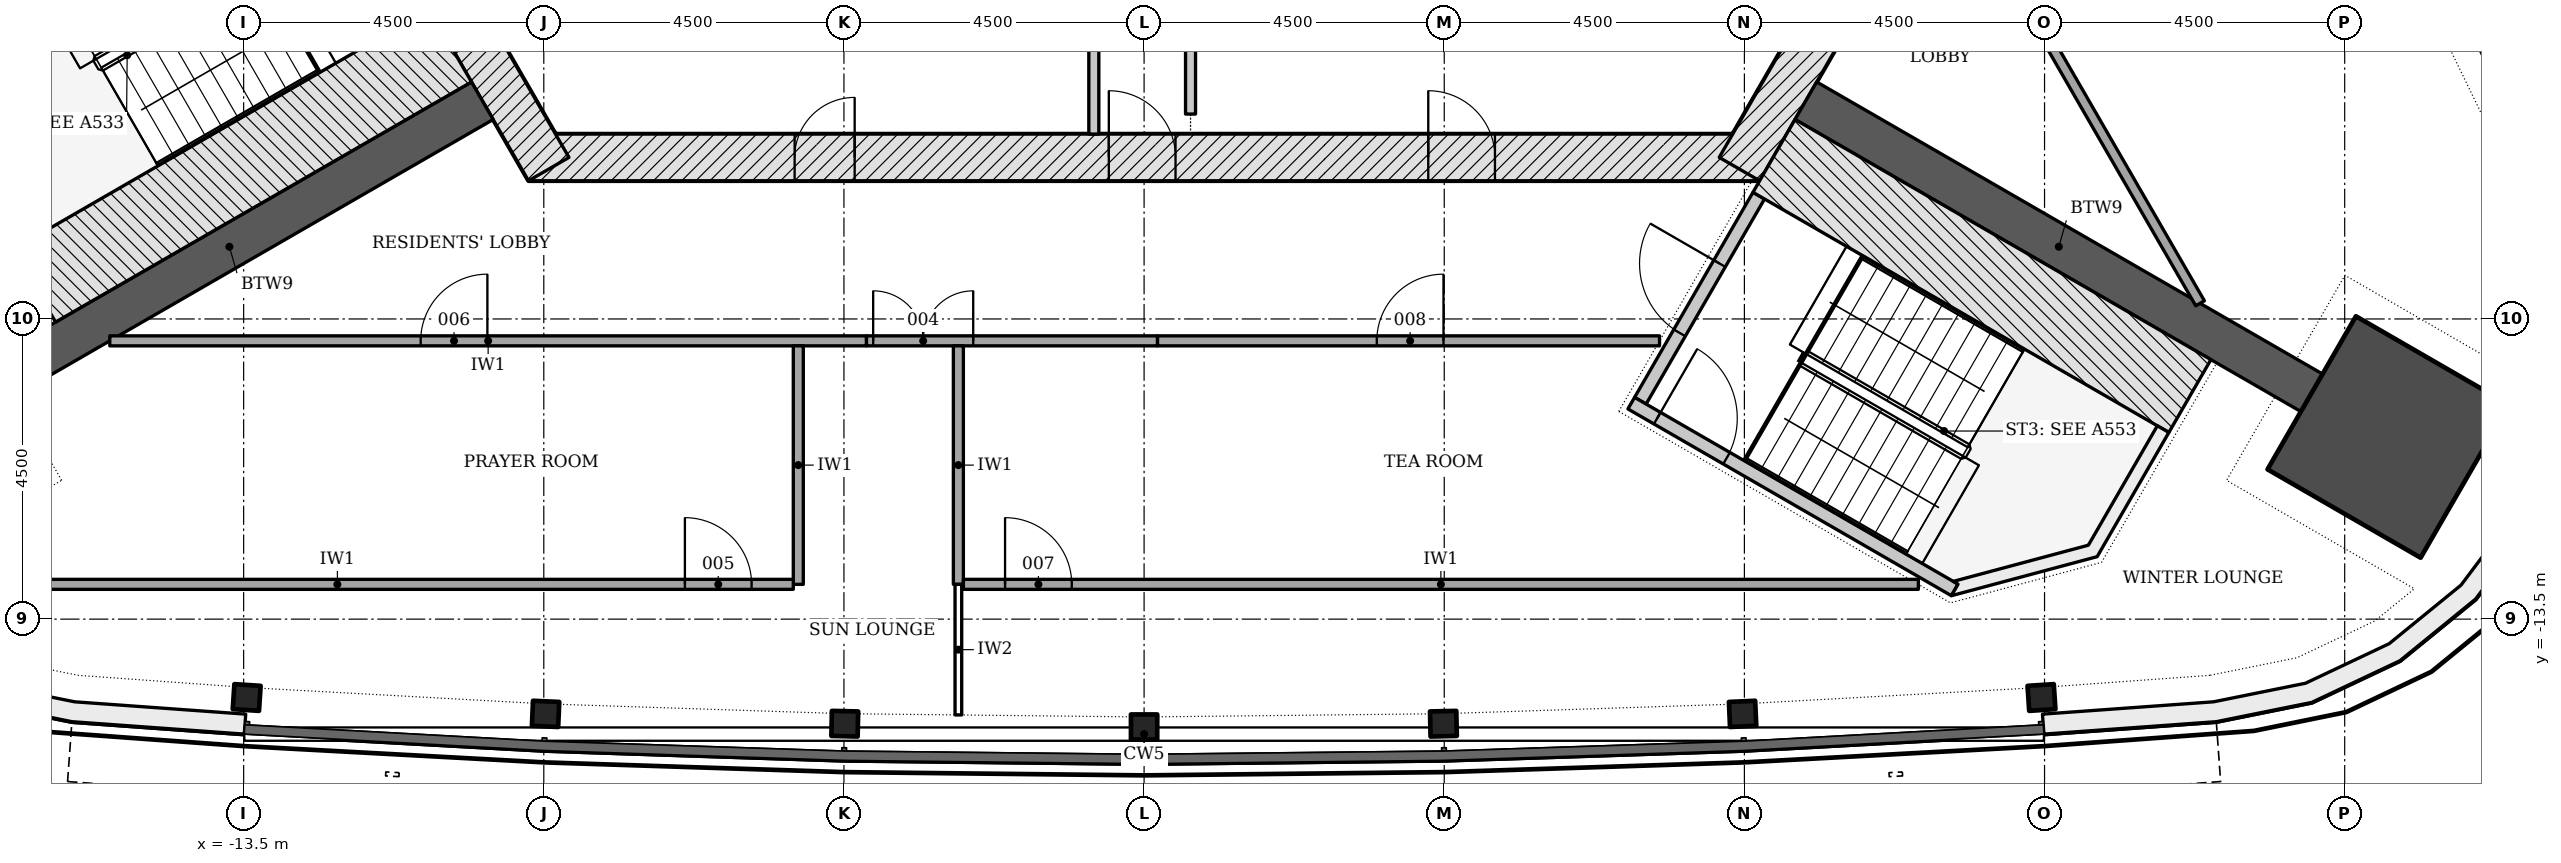
"""IFC4 building model, lengths in metres.
Left out: names, types, materials, properties, quantities, classifications, styles, units other than length and angle.
Written with IfcOpenShell. Run it as: python <this file> out.ifc"""

import sys

from ifc_helpers import new_model, si_unit, direction, frame, frame_2d, origin, origin_2d, place, context, subcontext, project, spatial, polyline, rectangle, i_section, outline, extrude, element, fill, save


model = new_model("IFC4")
c1 = context("Model", 3, precision=1e-05, world=origin(), true_north=direction((0.0, 1.0)))
c2 = subcontext(c1, "Body", "Model", "MODEL_VIEW")
j1 = project(units=[si_unit("LENGTHUNIT", "METRE"), si_unit("PLANEANGLEUNIT", "RADIAN")], contexts=[c1])
p1 = place(None, origin())
s1 = spatial("IfcSite", under=j1, at=p1, CompositionType="ELEMENT")
p2 = place(p1, origin())
s2 = spatial("IfcBuilding", under=s1, at=p2, CompositionType="ELEMENT")
p3 = place(p2, frame((0.0, 0.0, 203.1)))
s3 = spatial("IfcBuildingStorey", under=s2, at=p3, CompositionType="ELEMENT", Elevation=203.1)
p4 = place(p3, frame((-9.229, -6.578, -0.2), z_axis=(0.0, 0.0, 1.0), x_axis=(1.0, 0.0, 0.0)))
e1 = element("IfcWall", 1, at=p4, inside=s3, PredefinedType="SHEAR", context=c2, shape_type="SweptSolid", body=[
    extrude(rectangle(XDim=18.458, YDim=0.7, at=frame_2d((9.229, 0.0))), origin(), (0.0, 0.0, 1.0), 3.6),
])
p5 = place(p4, frame((8.7, 0.0, 0.2)))
e2 = element("IfcOpeningElement", 2, at=p5, cuts=e1, PredefinedType="OPENING", context=c2, shape_type="SweptSolid", body=[
    extrude(rectangle(XDim=1.0, YDim=2.1, at=frame_2d((0.5, 1.05))), frame((0.0, 0.36, 0.0), z_axis=(0.0, -1.0, 0.0), x_axis=(1.0, 0.0, 0.0)), (0.0, 0.0, 1.0), 0.72),
])
p6 = place(p4, frame((3.99, 0.0, 0.2)))
e3 = element("IfcOpeningElement", 3, at=p6, cuts=e1, PredefinedType="OPENING", context=c2, shape_type="SweptSolid", body=[
    extrude(rectangle(XDim=0.9, YDim=2.1, at=frame_2d((0.45, 1.05))), frame((0.0, 0.36, 0.0), z_axis=(0.0, -1.0, 0.0), x_axis=(1.0, 0.0, 0.0)), (0.0, 0.0, 1.0), 0.72),
])
p7 = place(p4, frame((13.489, 0.0, 0.2)))
e4 = element("IfcOpeningElement", 4, at=p7, cuts=e1, PredefinedType="OPENING", context=c2, shape_type="SweptSolid", body=[
    extrude(rectangle(XDim=1.0, YDim=2.1, at=frame_2d((0.5, 1.05))), frame((0.0, 0.36, 0.0), z_axis=(0.0, -1.0, 0.0), x_axis=(1.0, 0.0, 0.0)), (0.0, 0.0, 1.0), 0.72),
])
for number, where, z_axis, x_axis in (
    (5, (8.926, -6.753, -0.2), (0.0, 0.0, 1.0), (0.5, 0.866, 0.0)),
    (6, (-10.311, -4.353, -0.2), (0.0, 0.0, 1.0), (0.5, -0.866, 0.0)),
):
    element("IfcWall", number, at=place(p3, frame(where, z_axis=z_axis, x_axis=x_axis)), inside=s3, PredefinedType="SHEAR", context=c2, shape_type="SweptSolid", body=[
        extrude(rectangle(XDim=2.771, YDim=0.7, at=frame_2d((1.386, 0.0))), origin(), (0.0, 0.0, 1.0), 3.6),
    ])
for number, where, z_axis, x_axis in (
    (7, (-9.922, -5.728, -0.2), (0.0, 0.0, 1.0), (-0.866, -0.5, 0.0)),
    (8, (9.922, -5.728, -0.2), (0.0, 0.0, 1.0), (0.866, -0.5, 0.0)),
):
    element("IfcWall", number, at=place(p3, frame(where, z_axis=z_axis, x_axis=x_axis)), inside=s3, PredefinedType="SHEAR", context=c2, shape_type="SweptSolid", body=[
        extrude(rectangle(XDim=8.758, YDim=0.65, at=frame_2d((4.379, 0.0))), origin(), (0.0, 0.0, 1.0), 3.6),
    ])
p8 = place(p3, frame((18.653, -10.77, -0.2), z_axis=(0.0, 0.0, 1.0), x_axis=(0.866025403784, -0.5, 0.0)))
e9 = element("IfcColumn", 9, at=p8, inside=s3, PredefinedType="COLUMN", context=c2, shape_type="SweptSolid", body=[
    extrude(rectangle(XDim=2.65, YDim=2.65, at=origin_2d()), origin(), (0.0, 0.0, 1.0), 3.6),
])
for number, where, z_axis, x_axis in (
    (10, (-13.454, -14.675, -0.2), (0.0, 0.0, 1.0), (0.998, -0.066, 0.0)),
    (11, (-8.973, -14.92, -0.2), (0.0, 0.0, 1.0), (0.999, -0.044, 0.0)),
    (12, (-4.488, -15.068, -0.2), (0.0, 0.0, 1.0), (1.0, -0.022, 0.0)),
    (13, (0.0, -15.117, -0.2), (0.0, 0.0, 1.0), (1.0, 0.0, 0.0)),
    (14, (4.488, -15.068, -0.2), (0.0, 0.0, 1.0), (1.0, 0.022, 0.0)),
    (15, (8.973, -14.92, -0.2), (0.0, 0.0, 1.0), (0.999, 0.044, 0.0)),
    (16, (13.454, -14.675, -0.2), (0.0, 0.0, 1.0), (0.998, 0.066, 0.0)),
):
    element("IfcColumn", number, at=place(p3, frame(where, z_axis=z_axis, x_axis=x_axis)), inside=s3, PredefinedType="COLUMN", context=c2, shape_type="SweptSolid", body=[
        extrude(i_section(OverallWidth=0.394, OverallDepth=0.376, WebThickness=0.017, FlangeThickness=0.028, FilletRadius=0.015, at=origin_2d()), origin(), (0.0, 0.0, 1.0), 3.6),
    ])
p9 = place(p3, origin())
e17 = element("IfcWall", 17, at=p9, inside=s3, PredefinedType="NOTDEFINED", context=c2, shape_type="SweptSolid", body=[
    extrude(outline(polyline([(-19.929, -4.071), (-21.06, -6.403), (-21.526, -7.788), (-21.646, -9.245), (-21.412, -10.687), (-20.84, -12.032), (-19.961, -13.2), (-18.829, -14.123), (-17.508, -14.748), (-16.075, -15.037), (-13.49, -15.224), (-13.469, -14.925), (-16.034, -14.74), (-17.412, -14.461), (-18.667, -13.868), (-19.744, -12.99), (-20.578, -11.881), (-21.122, -10.603), (-21.344, -9.233), (-21.23, -7.849), (-20.782, -6.516), (-19.659, -4.202), (-19.929, -4.071)])), origin(), (0.0, 0.0, 1.0), 3.3),
])
p10 = place(p3, origin())
e18 = element("IfcWall", 18, at=p10, inside=s3, PredefinedType="NOTDEFINED", context=c2, shape_type="SweptSolid", body=[
    extrude(outline(polyline([(13.49, -15.224), (16.075, -15.037), (17.508, -14.748), (18.829, -14.123), (19.961, -13.2), (20.84, -12.032), (21.412, -10.687), (21.646, -9.245), (21.526, -7.788), (21.06, -6.403), (19.929, -4.071), (19.659, -4.202), (20.782, -6.516), (21.23, -7.849), (21.344, -9.233), (21.122, -10.603), (20.578, -11.881), (19.744, -12.99), (18.667, -13.868), (17.412, -14.461), (16.034, -14.74), (13.469, -14.925), (13.49, -15.224)])), origin(), (0.0, 0.0, 1.0), 3.3),
])
p11 = place(p3, frame((-0.754, 5.772, 0.0), z_axis=(0.0, 0.0, 1.0), x_axis=(0.0, -1.0, 0.0)))
e19 = element("IfcWall", 19, at=p11, inside=s3, PredefinedType="PARTITIONING", context=c2, shape_type="SweptSolid", body=[
    extrude(rectangle(XDim=12.0, YDim=0.15, at=frame_2d((6.0, 0.0))), origin(), (0.0, 0.0, 1.0), 3.4),
])
p12 = place(p11, frame((4.051, 0.0, 0.0)))
e20 = element("IfcOpeningElement", 20, at=p12, cuts=e19, PredefinedType="OPENING", context=c2, shape_type="SweptSolid", body=[
    extrude(rectangle(XDim=0.9, YDim=2.1, at=frame_2d((0.45, 1.05))), frame((0.0, 0.085, 0.0), z_axis=(0.0, -1.0, 0.0), x_axis=(1.0, 0.0, 0.0)), (0.0, 0.0, 1.0), 0.17),
])
p13 = place(p3, frame((0.696, -5.928, 0.0), z_axis=(0.0, 0.0, 1.0), x_axis=(0.0, 1.0, 0.0)))
e21 = element("IfcWall", 21, at=p13, inside=s3, PredefinedType="PARTITIONING", context=c2, shape_type="SweptSolid", body=[
    extrude(rectangle(XDim=11.549, YDim=0.15, at=frame_2d((5.774, 0.0))), origin(), (0.0, 0.0, 1.0), 3.4),
])
p14 = place(p13, frame((6.673, 0.0, 0.0)))
e22 = element("IfcOpeningElement", 22, at=p14, cuts=e21, PredefinedType="OPENING", context=c2, shape_type="SweptSolid", body=[
    extrude(rectangle(XDim=0.9, YDim=2.1, at=frame_2d((0.45, 1.05))), frame((0.0, 0.085, 0.0), z_axis=(0.0, -1.0, 0.0), x_axis=(1.0, 0.0, 0.0)), (0.0, 0.0, 1.0), 0.17),
])
p15 = place(p3, frame((-10.399, -4.901, -0.2), z_axis=(0.0, 0.0, 1.0), x_axis=(-0.866018442252, -0.500012057535, 0.0)))
e23 = element("IfcWall", 23, at=p15, inside=s3, PredefinedType="SHEAR", context=c2, shape_type="SweptSolid", body=[
    extrude(rectangle(XDim=7.2, YDim=1.261, at=frame_2d((3.6, 0.0))), origin(), (0.0, 0.0, 1.0), 3.6),
])
p16 = place(p3, frame((7.44, -10.226, -0.2), z_axis=(0.0, 0.0, 1.0), x_axis=(0.500022077904, 0.866012656725, 0.0)))
e24 = element("IfcWall", 24, at=p16, inside=s3, PredefinedType="SHEAR", context=c2, shape_type="SweptSolid", body=[
    extrude(rectangle(XDim=3.55, YDim=0.2, at=frame_2d((1.775, 0.0))), origin(), (0.0, 0.0, 1.0), 3.6),
])
p17 = place(p16, frame((1.175, 0.0, 0.2)))
e25 = element("IfcOpeningElement", 25, at=p17, cuts=e24, PredefinedType="OPENING", context=c2, shape_type="SweptSolid", body=[
    extrude(rectangle(XDim=1.2, YDim=2.1, at=frame_2d((0.6, 1.05))), frame((0.0, 0.11, 0.0), z_axis=(0.0, -1.0, 0.0), x_axis=(1.0, 0.0, 0.0)), (0.0, 0.0, 1.0), 0.22),
])
p18 = place(p3, frame((7.304, -10.262, -0.2), z_axis=(0.0, 0.0, 1.0), x_axis=(0.866026594901, -0.49999793692, 0.0)))
e26 = element("IfcWall", 26, at=p18, inside=s3, PredefinedType="SHEAR", context=c2, shape_type="SweptSolid", body=[
    extrude(rectangle(XDim=5.6, YDim=0.2, at=frame_2d((2.8, 0.0))), origin(), (0.0, 0.0, 1.0), 3.6),
])
p19 = place(p18, frame((0.45, 0.0, 0.2)))
e27 = element("IfcOpeningElement", 27, at=p19, cuts=e26, PredefinedType="OPENING", context=c2, shape_type="SweptSolid", body=[
    extrude(rectangle(XDim=1.2, YDim=2.1, at=frame_2d((0.6, 1.05))), frame((0.0, 0.11, 0.0), z_axis=(0.0, -1.0, 0.0), x_axis=(1.0, 0.0, 0.0)), (0.0, 0.0, 1.0), 0.22),
])
p20 = place(p3, frame((9.444, -6.555, -0.2), z_axis=(0.0, 0.0, 1.0), x_axis=(0.866018442252, -0.500012057535, 0.0)))
e28 = element("IfcWall", 28, at=p20, inside=s3, PredefinedType="SHEAR", context=c2, shape_type="SweptSolid", body=[
    extrude(rectangle(XDim=7.2, YDim=1.261, at=frame_2d((3.6, 0.0))), origin(), (0.0, 0.0, 1.0), 3.6),
])
p21 = place(p3, frame((0.0, 0.0, -0.2)))
e29 = element("IfcWall", 29, at=p21, inside=s3, PredefinedType="SHEAR", context=c2, shape_type="SweptSolid", body=[
    extrude(outline(polyline([(12.104, -13.149), (14.289, -12.563), (15.364, -10.701), (15.191, -10.601), (14.157, -12.392), (12.132, -12.934), (12.204, -12.976), (12.204, -12.976), (12.204, -12.976), (12.204, -12.976), (12.204, -12.976), (12.204, -12.976), (12.204, -12.976), (12.204, -12.976), (12.204, -12.976), (12.204, -12.976), (12.204, -12.976), (12.204, -12.976), (12.204, -12.976), (12.204, -12.976), (12.204, -12.976), (12.204, -12.976), (12.204, -12.976), (12.104, -13.149)])), origin(), (0.0, 0.0, 1.0), 3.6),
])
p22 = place(p3, frame((15.832, -8.765, 0.0), z_axis=(0.0, 0.0, 1.0), x_axis=(-0.499997377664, 0.866026917785, 0.0)))
e30 = element("IfcWall", 30, at=p22, inside=s3, PredefinedType="PARTITIONING", context=c2, shape_type="SweptSolid", body=[
    extrude(rectangle(XDim=15.707, YDim=0.15, at=frame_2d((7.854, 0.0))), origin(), (0.0, 0.0, 1.0), 2.852),
])
p23 = place(p3, frame((-15.507, -9.328, 0.0), z_axis=(0.0, 0.0, 1.0), x_axis=(1.0, 0.0, 0.0)))
e31 = element("IfcWall", 31, at=p23, inside=s3, PredefinedType="PARTITIONING", context=c2, shape_type="SweptSolid", body=[
    extrude(rectangle(XDim=11.345, YDim=0.15, at=frame_2d((5.672, 0.0))), origin(), (0.0, 0.0, 1.0), 2.852),
])
p24 = place(p23, frame((4.661, 0.0, 0.0)))
e32 = element("IfcOpeningElement", 32, at=p24, cuts=e31, PredefinedType="OPENING", context=c2, shape_type="SweptSolid", body=[
    extrude(rectangle(XDim=1.0, YDim=2.1, at=frame_2d((0.5, 1.05))), frame((0.0, 0.085, 0.0), z_axis=(0.0, -1.0, 0.0), x_axis=(1.0, 0.0, 0.0)), (0.0, 0.0, 1.0), 0.17),
])
p25 = place(p3, frame((0.2, -9.328, 0.0), z_axis=(0.0, 0.0, 1.0), x_axis=(1.0, 0.0, 0.0)))
e33 = element("IfcWall", 33, at=p25, inside=s3, PredefinedType="PARTITIONING", context=c2, shape_type="SweptSolid", body=[
    extrude(rectangle(XDim=7.528, YDim=0.15, at=frame_2d((3.764, 0.0))), origin(), (0.0, 0.0, 1.0), 2.852),
])
p26 = place(p25, frame((3.289, 0.0, 0.0)))
e34 = element("IfcOpeningElement", 34, at=p26, cuts=e33, PredefinedType="OPENING", context=c2, shape_type="SweptSolid", body=[
    extrude(rectangle(XDim=1.0, YDim=2.1, at=frame_2d((0.5, 1.05))), frame((0.0, 0.085, 0.0), z_axis=(0.0, -1.0, 0.0), x_axis=(1.0, 0.0, 0.0)), (0.0, 0.0, 1.0), 0.17),
])
p27 = place(p3, frame((-4.162, -9.328, 0.0), z_axis=(0.0, 0.0, 1.0), x_axis=(1.0, 0.0, 0.0)))
e35 = element("IfcWall", 35, at=p27, inside=s3, PredefinedType="PARTITIONING", context=c2, shape_type="SweptSolid", body=[
    extrude(rectangle(XDim=4.362, YDim=0.15, at=frame_2d((2.181, 0.0))), origin(), (0.0, 0.0, 1.0), 2.852),
])
p28 = place(p27, frame((0.1, 0.0, 0.0)))
e36 = element("IfcOpeningElement", 36, at=p28, cuts=e35, PredefinedType="OPENING", context=c2, shape_type="SweptSolid", body=[
    extrude(rectangle(XDim=1.5, YDim=2.1, at=frame_2d((0.75, 1.05))), frame((0.0, 0.085, 0.0), z_axis=(0.0, -1.0, 0.0), x_axis=(1.0, 0.0, 0.0)), (0.0, 0.0, 1.0), 0.17),
])
for number, where, z_axis, x_axis in (
    (37, (-5.184, -9.403, 0.0), (0.0, 0.0, 1.0), (0.0, -1.0, 0.0)),
    (38, (-2.784, -9.403, 0.0), (0.0, 0.0, 1.0), (0.0, -1.0, 0.0)),
):
    element("IfcWall", number, at=place(p3, frame(where, z_axis=z_axis, x_axis=x_axis)), inside=s3, PredefinedType="PARTITIONING", context=c2, shape_type="SweptSolid", body=[
        extrude(rectangle(XDim=3.575, YDim=0.15, at=frame_2d((1.788, 0.0))), origin(), (0.0, 0.0, 1.0), 3.4),
    ])
p29 = place(p3, frame((-2.784, -12.979, 0.0), z_axis=(0.0, 0.0, 1.0), x_axis=(0.0, -1.0, 0.0)))
e39 = element("IfcWall", 39, at=p29, inside=s3, PredefinedType="PARTITIONING", context=c2, shape_type="SweptSolid", body=[
    extrude(rectangle(XDim=1.958, YDim=0.1, at=frame_2d((0.979, 0.0))), origin(), (0.0, 0.0, 1.0), 3.4),
])
p30 = place(p3, frame((-18.93, -12.979, 0.0), z_axis=(0.0, 0.0, 1.0), x_axis=(1.0, 0.0, 0.0)))
e40 = element("IfcWall", 40, at=p30, inside=s3, PredefinedType="PARTITIONING", context=c2, shape_type="SweptSolid", body=[
    extrude(rectangle(XDim=13.67, YDim=0.15, at=frame_2d((6.835, 0.0))), origin(), (0.0, 0.0, 1.0), 2.852),
])
p31 = place(p30, frame((12.045, 0.0, 0.0)))
e41 = element("IfcOpeningElement", 41, at=p31, cuts=e40, PredefinedType="OPENING", context=c2, shape_type="SweptSolid", body=[
    extrude(rectangle(XDim=1.0, YDim=2.1, at=frame_2d((0.5, 1.05))), frame((0.0, 0.085, 0.0), z_axis=(0.0, -1.0, 0.0), x_axis=(1.0, 0.0, 0.0)), (0.0, 0.0, 1.0), 0.17),
])
p32 = place(p3, frame((-2.709, -12.979, 0.0), z_axis=(0.0, 0.0, 1.0), x_axis=(1.0, 0.0, 0.0)))
e42 = element("IfcWall", 42, at=p32, inside=s3, PredefinedType="PARTITIONING", context=c2, shape_type="SweptSolid", body=[
    extrude(rectangle(XDim=14.318, YDim=0.15, at=frame_2d((7.159, 0.0))), origin(), (0.0, 0.0, 1.0), 2.852),
])
p33 = place(p32, frame((0.625, 0.0, 0.0)))
e43 = element("IfcOpeningElement", 43, at=p33, cuts=e42, PredefinedType="OPENING", context=c2, shape_type="SweptSolid", body=[
    extrude(rectangle(XDim=1.0, YDim=2.1, at=frame_2d((0.5, 1.05))), frame((0.0, 0.085, 0.0), z_axis=(0.0, -1.0, 0.0), x_axis=(1.0, 0.0, 0.0)), (0.0, 0.0, 1.0), 0.17),
])
p34 = place(p5, origin())
e44 = element("IfcDoor", 44, at=p34, inside=s3, OperationType="SINGLE_SWING_LEFT", PredefinedType="DOOR", context=c2, shape_type="SweptSolid", body=[
    extrude(rectangle(XDim=1.0, YDim=2.1, at=frame_2d((0.5, 1.05))), frame((0.0, 0.075, 0.0), z_axis=(0.0, -1.0, 0.0), x_axis=(1.0, 0.0, 0.0)), (0.0, 0.0, 1.0), 0.15),
])
fill(e2, e44)
p35 = place(p6, origin())
e45 = element("IfcDoor", 45, at=p35, inside=s3, OperationType="SINGLE_SWING_RIGHT", PredefinedType="DOOR", context=c2, shape_type="SweptSolid", body=[
    extrude(rectangle(XDim=0.9, YDim=2.1, at=frame_2d((0.45, 1.05))), frame((0.0, 0.075, 0.0), z_axis=(0.0, -1.0, 0.0), x_axis=(1.0, 0.0, 0.0)), (0.0, 0.0, 1.0), 0.15),
])
fill(e3, e45)
p36 = place(p7, origin())
e46 = element("IfcDoor", 46, at=p36, inside=s3, OperationType="SINGLE_SWING_LEFT", PredefinedType="DOOR", context=c2, shape_type="SweptSolid", body=[
    extrude(rectangle(XDim=1.0, YDim=2.1, at=frame_2d((0.5, 1.05))), frame((0.0, 0.075, 0.0), z_axis=(0.0, -1.0, 0.0), x_axis=(1.0, 0.0, 0.0)), (0.0, 0.0, 1.0), 0.15),
])
fill(e4, e46)
p37 = place(p17, origin())
e47 = element("IfcDoor", 47, at=p37, inside=s3, OperationType="SINGLE_SWING_RIGHT", PredefinedType="DOOR", context=c2, shape_type="SweptSolid", body=[
    extrude(rectangle(XDim=1.2, YDim=2.1, at=frame_2d((0.6, 1.05))), frame((0.0, 0.025, 0.0), z_axis=(0.0, -1.0, 0.0), x_axis=(1.0, 0.0, 0.0)), (0.0, 0.0, 1.0), 0.05),
])
fill(e25, e47)
p38 = place(p19, origin())
e48 = element("IfcDoor", 48, at=p38, inside=s3, OperationType="SINGLE_SWING_LEFT", PredefinedType="DOOR", context=c2, shape_type="SweptSolid", body=[
    extrude(rectangle(XDim=1.2, YDim=2.1, at=frame_2d((0.6, 1.05))), frame((0.0, 0.025, 0.0), z_axis=(0.0, -1.0, 0.0), x_axis=(1.0, 0.0, 0.0)), (0.0, 0.0, 1.0), 0.05),
])
fill(e27, e48)
p39 = place(p28, origin())
e49 = element("IfcDoor", 49, at=p39, inside=s3, OperationType="DOUBLE_DOOR_SINGLE_SWING", PredefinedType="DOOR", context=c2, shape_type="SweptSolid", body=[
    extrude(rectangle(XDim=1.5, YDim=2.1, at=frame_2d((0.75, 1.05))), frame((0.0, 0.025, 0.0), z_axis=(0.0, -1.0, 0.0), x_axis=(1.0, 0.0, 0.0)), (0.0, 0.0, 1.0), 0.05),
])
fill(e36, e49)
p40 = place(p31, origin())
e50 = element("IfcDoor", 50, at=p40, inside=s3, OperationType="SINGLE_SWING_LEFT", PredefinedType="DOOR", context=c2, shape_type="SweptSolid", body=[
    extrude(rectangle(XDim=1.0, YDim=2.1, at=frame_2d((0.5, 1.05))), frame((0.0, 0.025, 0.0), z_axis=(0.0, -1.0, 0.0), x_axis=(1.0, 0.0, 0.0)), (0.0, 0.0, 1.0), 0.05),
])
fill(e41, e50)
p41 = place(p24, origin())
e51 = element("IfcDoor", 51, at=p41, inside=s3, OperationType="SINGLE_SWING_RIGHT", PredefinedType="DOOR", context=c2, shape_type="SweptSolid", body=[
    extrude(rectangle(XDim=1.0, YDim=2.1, at=frame_2d((0.5, 1.05))), frame((0.0, 0.025, 0.0), z_axis=(0.0, -1.0, 0.0), x_axis=(1.0, 0.0, 0.0)), (0.0, 0.0, 1.0), 0.05),
])
fill(e32, e51)
p42 = place(p33, origin())
e52 = element("IfcDoor", 52, at=p42, inside=s3, OperationType="SINGLE_SWING_LEFT", PredefinedType="DOOR", context=c2, shape_type="SweptSolid", body=[
    extrude(rectangle(XDim=1.0, YDim=2.1, at=frame_2d((0.5, 1.05))), frame((0.0, 0.025, 0.0), z_axis=(0.0, -1.0, 0.0), x_axis=(1.0, 0.0, 0.0)), (0.0, 0.0, 1.0), 0.05),
])
fill(e43, e52)
p43 = place(p26, origin())
e53 = element("IfcDoor", 53, at=p43, inside=s3, OperationType="SINGLE_SWING_RIGHT", PredefinedType="DOOR", context=c2, shape_type="SweptSolid", body=[
    extrude(rectangle(XDim=1.0, YDim=2.1, at=frame_2d((0.5, 1.05))), frame((0.0, 0.025, 0.0), z_axis=(0.0, -1.0, 0.0), x_axis=(1.0, 0.0, 0.0)), (0.0, 0.0, 1.0), 0.05),
])
fill(e34, e53)
save(model, sys.argv[1])
